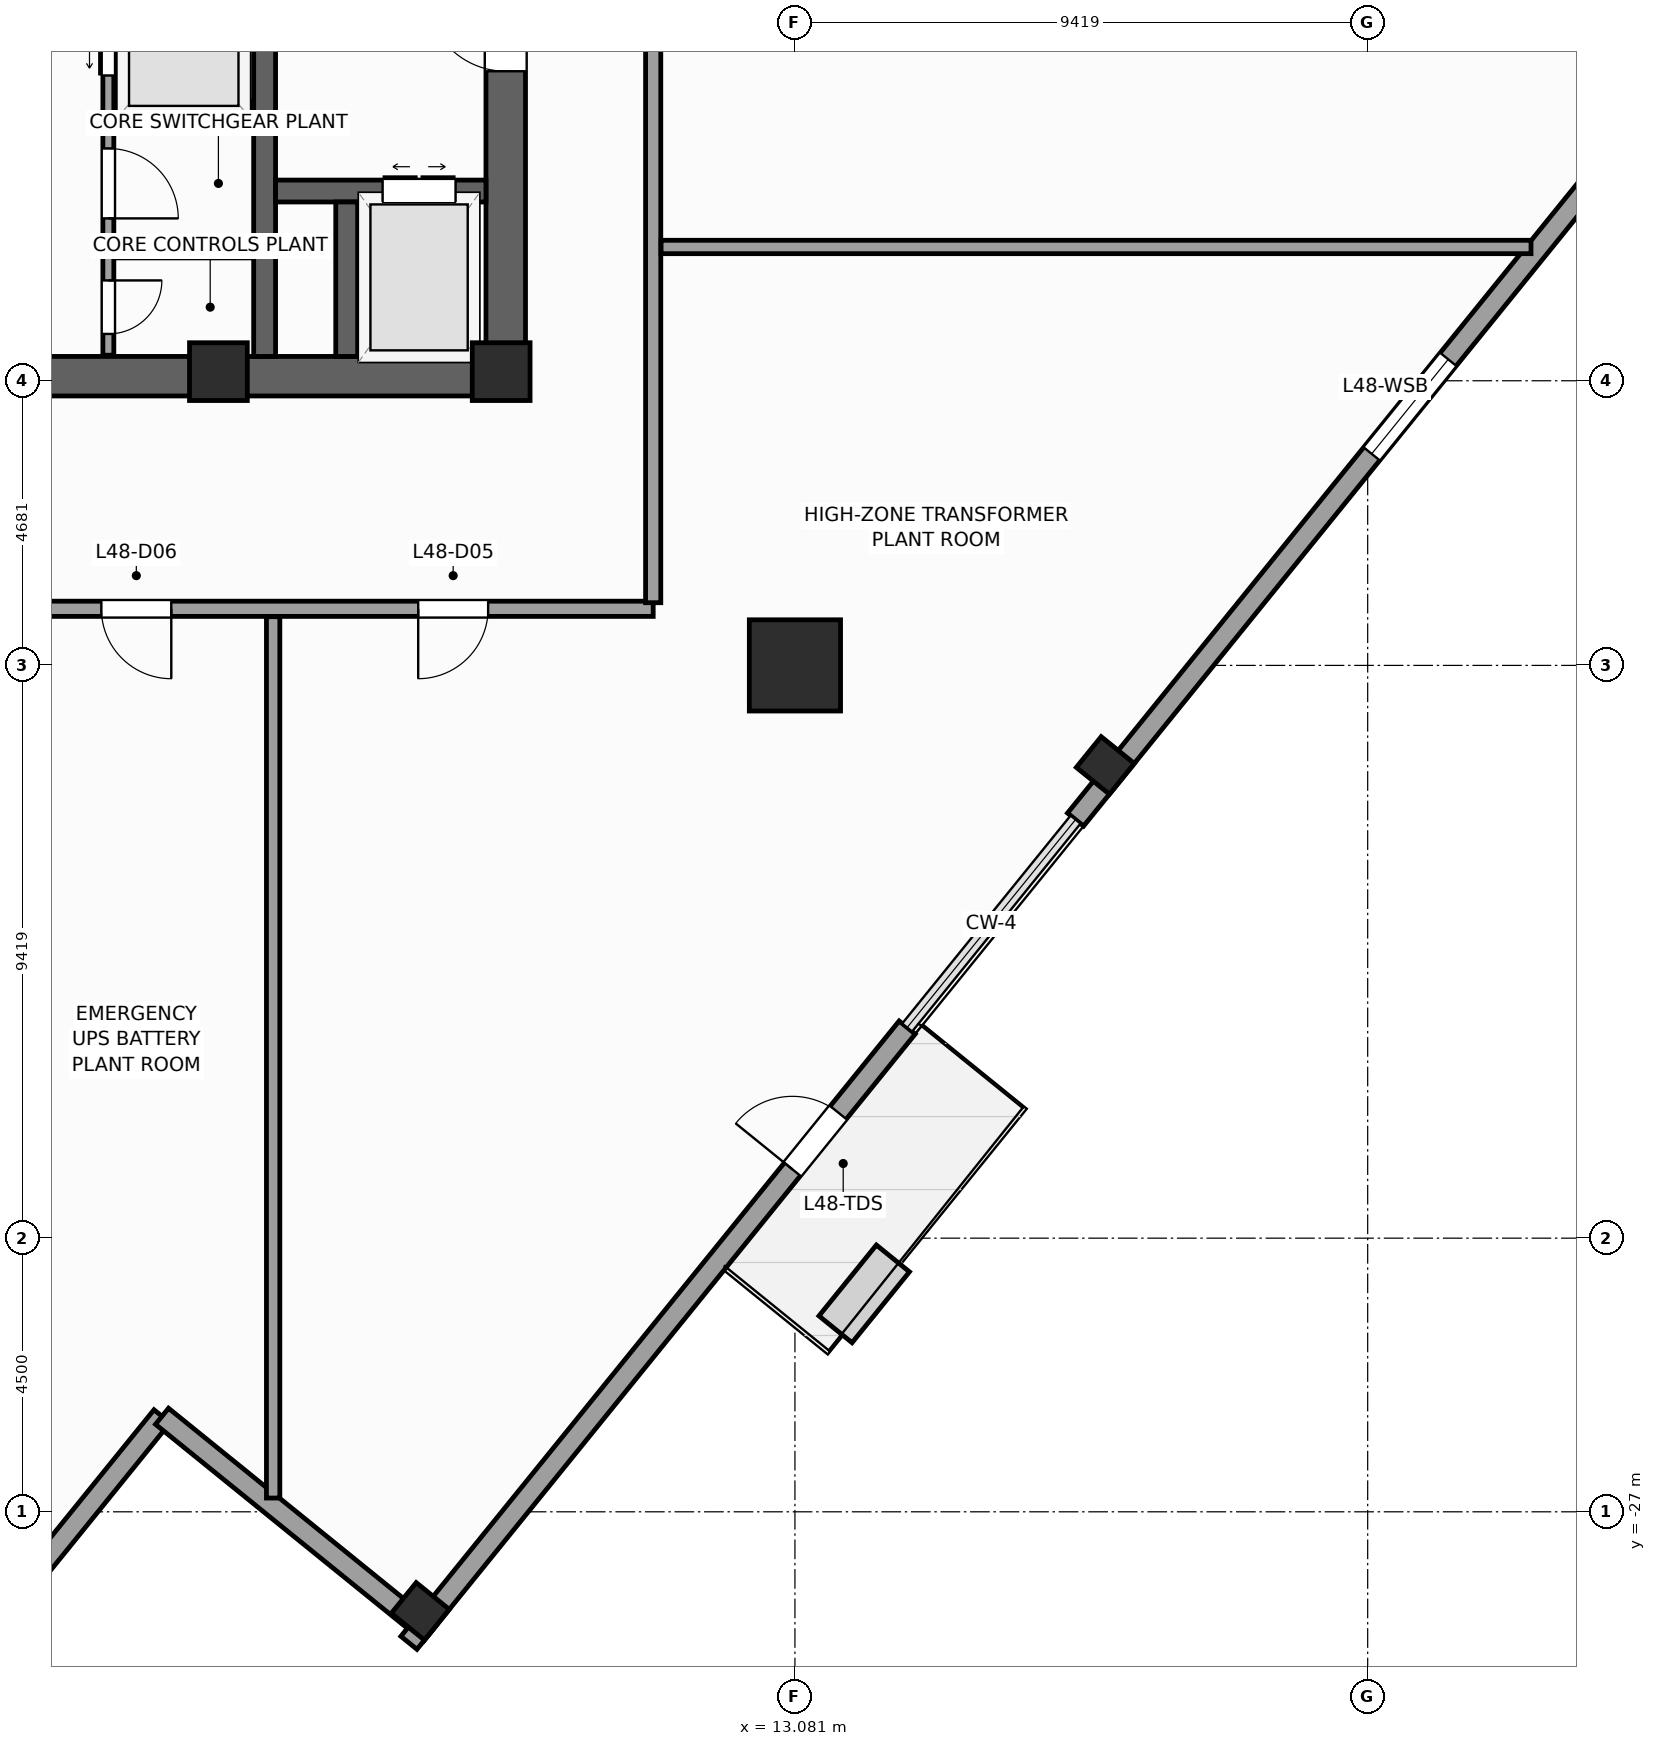
"""IFC4 building model, lengths in metres.
Left out: names, types, materials, properties, quantities, classifications, styles, units other than length and angle.
Written with IfcOpenShell. Run it as: python <this file> out.ifc"""

import sys

from ifc_helpers import new_model, si_unit, direction, frame, frame_2d, origin, origin_2d, place, context, subcontext, project, spatial, rectangle, extrude, source, transform, mapped, element, fill, save


model = new_model("IFC4")
c1 = context("Model", 3, precision=1e-05, world=origin(), true_north=direction((0.0, 1.0)))
c2 = subcontext(c1, "Body", "Model", "MODEL_VIEW")
j1 = project(units=[si_unit("LENGTHUNIT", "METRE"), si_unit("PLANEANGLEUNIT", "RADIAN")], contexts=[c1])
p1 = place(None, origin())
s1 = spatial("IfcSite", under=j1, at=p1, CompositionType="ELEMENT")
p2 = place(p1, origin())
s2 = spatial("IfcBuilding", under=s1, at=p2, CompositionType="ELEMENT")
p3 = place(p2, frame((0.0, 0.0, 200.4)))
s3 = spatial("IfcBuildingStorey", under=s2, at=p3, CompositionType="ELEMENT", Elevation=200.4)
p4 = place(p3, frame((-8.65, -8.325, 0.0), z_axis=(0.0, 0.0, 1.0), x_axis=(1.0, 0.0, 0.0)))
e1 = element("IfcWall", 1, at=p4, inside=s3, PredefinedType="SHEAR", context=c2, shape_type="SweptSolid", body=[
    extrude(rectangle(XDim=17.3, YDim=0.65, at=frame_2d((8.65, 0.0))), origin(), (0.0, 0.0, 1.0), 5.2),
])
p5 = place(p4, frame((8.0, 0.0, 0.0)))
e2 = element("IfcOpeningElement", 2, at=p5, cuts=e1, PredefinedType="OPENING", context=c2, shape_type="SweptSolid", body=[
    extrude(rectangle(XDim=1.3, YDim=2.2, at=frame_2d((0.65, 1.1))), frame((0.0, 0.335, 0.0), z_axis=(0.0, -1.0, 0.0), x_axis=(1.0, 0.0, 0.0)), (0.0, 0.0, 1.0), 0.67),
])
p6 = place(p3, frame((8.325, -8.0, 0.0), z_axis=(0.0, 0.0, 1.0), x_axis=(0.0, 1.0, 0.0)))
e3 = element("IfcWall", 3, at=p6, inside=s3, PredefinedType="SHEAR", context=c2, shape_type="SweptSolid", body=[
    extrude(rectangle(XDim=16.0, YDim=0.65, at=frame_2d((8.0, 0.0))), origin(), (0.0, 0.0, 1.0), 5.2),
])
p7 = place(p6, frame((4.69, 0.0, 0.0)))
e4 = element("IfcOpeningElement", 4, at=p7, cuts=e3, PredefinedType="OPENING", context=c2, shape_type="SweptSolid", body=[
    extrude(rectangle(XDim=1.3, YDim=2.2, at=frame_2d((0.65, 1.1))), frame((0.0, 0.335, 0.0), z_axis=(0.0, -1.0, 0.0), x_axis=(1.0, 0.0, 0.0)), (0.0, 0.0, 1.0), 0.67),
])
p8 = place(p3, frame((4.36, -8.0, 0.0), z_axis=(0.0, 0.0, 1.0), x_axis=(0.0, 1.0, 0.0)))
e5 = element("IfcWall", 5, at=p8, inside=s3, PredefinedType="SHEAR", context=c2, shape_type="SweptSolid", body=[
    extrude(rectangle(XDim=16.0, YDim=0.36, at=frame_2d((8.0, 0.0))), origin(), (0.0, 0.0, 1.0), 5.2),
])
p9 = place(p3, frame((4.54, -5.28, 0.0), z_axis=(0.0, 0.0, 1.0), x_axis=(1.0, 0.0, 0.0)))
e6 = element("IfcWall", 6, at=p9, inside=s3, PredefinedType="SHEAR", context=c2, shape_type="SweptSolid", body=[
    extrude(rectangle(XDim=3.46, YDim=0.36, at=frame_2d((1.73, 0.0))), origin(), (0.0, 0.0, 1.0), 5.2),
])
p10 = place(p9, frame((1.76, 0.0, 0.0)))
e7 = element("IfcOpeningElement", 7, at=p10, cuts=e6, PredefinedType="OPENING", context=c2, shape_type="SweptSolid", body=[
    extrude(rectangle(XDim=1.2, YDim=2.25, at=frame_2d((0.6, 1.125))), frame((0.0, 0.19, 0.0), z_axis=(0.0, -1.0, 0.0), x_axis=(1.0, 0.0, 0.0)), (0.0, 0.0, 1.0), 0.38),
])
p11 = place(p3, frame((5.71, -8.0, 0.0), z_axis=(0.0, 0.0, 1.0), x_axis=(0.0, 1.0, 0.0)))
e8 = element("IfcWall", 8, at=p11, inside=s3, PredefinedType="SHEAR", context=c2, shape_type="SweptSolid", body=[
    extrude(rectangle(XDim=2.54, YDim=0.36, at=frame_2d((1.27, 0.0))), origin(), (0.0, 0.0, 1.0), 5.2),
])
m1 = source(origin(), c2, "Body", "SweptSolid", [
    extrude(rectangle(XDim=0.95, YDim=0.95, at=origin_2d()), origin(), (0.0, 0.0, 1.0), 5.2),
])
for number, where, z_axis, x_axis in (
    (9, (8.25, -8.25, 0.0), (0.0, 0.0, 1.0), (1.0, 0.0, 0.0)),
    (10, (3.6, -8.25, 0.0), (0.0, 0.0, 1.0), (1.0, 0.0, 0.0)),
):
    element("IfcColumn", number, at=place(p3, frame(where, z_axis=z_axis, x_axis=x_axis)), inside=s3, PredefinedType="PILASTER", context=c2, shape_type="MappedRepresentation", body=[
        mapped(m1, transform((0.0, 0.0, 0.0), scale=1.0)),
    ])
m2 = source(origin(), c2, "Body", "SweptSolid", [
    extrude(rectangle(XDim=1.5, YDim=1.5, at=origin_2d()), origin(), (0.0, 0.0, 1.0), 5.2),
])
p12 = place(p3, frame((13.081, -13.081, 0.0), z_axis=(0.0, 0.0, 1.0), x_axis=(1.0, 0.0, 0.0)))
e11 = element("IfcColumn", 11, at=p12, inside=s3, PredefinedType="COLUMN", context=c2, shape_type="MappedRepresentation", body=[
    mapped(m2, transform((0.0, 0.0, 0.0), scale=1.0)),
])
m3 = source(origin(), c2, "Body", "SweptSolid", [
    extrude(rectangle(XDim=0.65, YDim=0.7, at=origin_2d()), origin(), (0.0, 0.0, 1.0), 5.2),
])
for number, where, z_axis, x_axis in (
    (12, (6.92, -28.637, 0.0), (0.0, 0.0, 1.0), (0.629, 0.777, 0.0)),
    (13, (18.185, -14.726, 0.0), (0.0, 0.0, 1.0), (0.629, 0.777, 0.0)),
):
    element("IfcColumn", number, at=place(p3, frame(where, z_axis=z_axis, x_axis=x_axis)), inside=s3, PredefinedType="COLUMN", context=c2, shape_type="MappedRepresentation", body=[
        mapped(m3, transform((0.0, 0.0, 0.0), scale=1.0)),
    ])
p13 = place(p3, frame((-0.789, -29.703, 0.0), z_axis=(0.0, 0.0, 1.0), x_axis=(0.629323365087, 0.77714355312, 0.0)))
e14 = element("IfcWall", 14, at=p13, inside=s3, PredefinedType="STANDARD", context=c2, shape_type="SweptSolid", body=[
    extrude(rectangle(XDim=5.5, YDim=0.34, at=frame_2d((2.75, 0.0))), origin(), (0.0, 0.0, 1.0), 4.96),
])
p14 = place(p3, frame((2.673, -25.429, 0.0), z_axis=(0.0, 0.0, 1.0), x_axis=(0.777162640055, -0.629299794138, 0.0)))
e15 = element("IfcWall", 15, at=p14, inside=s3, PredefinedType="STANDARD", context=c2, shape_type="SweptSolid", body=[
    extrude(rectangle(XDim=5.67, YDim=0.34, at=frame_2d((2.835, 0.0))), origin(), (0.0, 0.0, 1.0), 4.96),
])
p15 = place(p3, frame((6.733, -29.154, 0.0), z_axis=(0.0, 0.0, 1.0), x_axis=(0.629326061894, 0.777141369263, 0.0)))
e16 = element("IfcWall", 16, at=p15, inside=s3, PredefinedType="STANDARD", context=c2, shape_type="SweptSolid", body=[
    extrude(rectangle(XDim=13.02, YDim=0.34, at=frame_2d((6.51, 0.0))), origin(), (0.0, 0.0, 1.0), 4.26),
])
p16 = place(p15, frame((10.02, 0.0, 0.0)))
e17 = element("IfcOpeningElement", 17, at=p16, cuts=e16, PredefinedType="OPENING", context=c2, shape_type="SweptSolid", body=[
    extrude(rectangle(XDim=1.2, YDim=2.3, at=frame_2d((0.6, 1.15))), frame((0.0, 0.18, 0.0), z_axis=(0.0, -1.0, 0.0), x_axis=(1.0, 0.0, 0.0)), (0.0, 0.0, 1.0), 0.36),
])
p17 = place(p3, frame((17.696, -15.616, 0.0), z_axis=(0.0, 0.0, 1.0), x_axis=(0.629324798011, 0.777142392749, 0.0)))
e18 = element("IfcWall", 18, at=p17, inside=s3, PredefinedType="STANDARD", context=c2, shape_type="SweptSolid", body=[
    extrude(rectangle(XDim=19.42, YDim=0.34, at=frame_2d((9.71, 0.0))), origin(), (0.0, 0.0, 1.0), 4.26),
])
p18 = place(p17, frame((7.739, 0.0, 0.65)))
e19 = element("IfcOpeningElement", 19, at=p18, cuts=e18, PredefinedType="OPENING", context=c2, shape_type="SweptSolid", body=[
    extrude(rectangle(XDim=2.0, YDim=1.45, at=frame_2d((1.0, 0.725))), frame((0.0, 0.18, 0.0), z_axis=(0.0, -1.0, 0.0), x_axis=(1.0, 0.0, 0.0)), (0.0, 0.0, 1.0), 0.36),
])
p19 = place(p3, frame((1.79, -7.98, 0.0), z_axis=(0.0, 0.0, 1.0), x_axis=(0.0, 1.0, 0.0)))
e20 = element("IfcWall", 20, at=p19, inside=s3, PredefinedType="PARTITIONING", context=c2, shape_type="SweptSolid", body=[
    extrude(rectangle(XDim=12.38, YDim=0.18, at=frame_2d((6.19, 0.0))), origin(), (0.0, 0.0, 1.0), 4.96),
])
p20 = place(p19, frame((4.6, 0.0, 0.0)))
e21 = element("IfcOpeningElement", 21, at=p20, cuts=e20, PredefinedType="OPENING", context=c2, shape_type="SweptSolid", body=[
    extrude(rectangle(XDim=1.1, YDim=2.2, at=frame_2d((0.55, 1.1))), frame((0.0, 0.1, 0.0), z_axis=(0.0, -1.0, 0.0), x_axis=(1.0, 0.0, 0.0)), (0.0, 0.0, 1.0), 0.2),
])
p21 = place(p19, frame((6.66, 0.0, 0.0)))
e22 = element("IfcOpeningElement", 22, at=p21, cuts=e20, PredefinedType="OPENING", context=c2, shape_type="SweptSolid", body=[
    extrude(rectangle(XDim=1.1, YDim=2.2, at=frame_2d((0.55, 1.1))), frame((0.0, 0.1, 0.0), z_axis=(0.0, -1.0, 0.0), x_axis=(1.0, 0.0, 0.0)), (0.0, 0.0, 1.0), 0.2),
])
p22 = place(p19, frame((0.35, 0.0, 0.0)))
e23 = element("IfcOpeningElement", 23, at=p22, cuts=e20, PredefinedType="OPENING", context=c2, shape_type="SweptSolid", body=[
    extrude(rectangle(XDim=0.88, YDim=2.1, at=frame_2d((0.44, 1.05))), frame((0.0, 0.1, 0.0), z_axis=(0.0, -1.0, 0.0), x_axis=(1.0, 0.0, 0.0)), (0.0, 0.0, 1.0), 0.2),
])
p23 = place(p19, frame((2.25, 0.0, 0.0)))
e24 = element("IfcOpeningElement", 24, at=p23, cuts=e20, PredefinedType="OPENING", context=c2, shape_type="SweptSolid", body=[
    extrude(rectangle(XDim=1.15, YDim=2.25, at=frame_2d((0.575, 1.125))), frame((0.0, 0.1, 0.0), z_axis=(0.0, -1.0, 0.0), x_axis=(1.0, 0.0, 0.0)), (0.0, 0.0, 1.0), 0.2),
])
p24 = place(p3, frame((1.89, -3.9, 0.0), z_axis=(0.0, 0.0, 1.0), x_axis=(1.0, 0.0, 0.0)))
e25 = element("IfcWall", 25, at=p24, inside=s3, PredefinedType="PARTITIONING", context=c2, shape_type="SweptSolid", body=[
    extrude(rectangle(XDim=2.28, YDim=0.18, at=frame_2d((1.14, 0.0))), origin(), (0.0, 0.0, 1.0), 4.96),
])
p25 = place(p3, frame((1.89, -6.3, 0.0), z_axis=(0.0, 0.0, 1.0), x_axis=(1.0, 0.0, 0.0)))
e26 = element("IfcWall", 26, at=p25, inside=s3, PredefinedType="PARTITIONING", context=c2, shape_type="SweptSolid", body=[
    extrude(rectangle(XDim=2.28, YDim=0.16, at=frame_2d((1.14, 0.0))), origin(), (0.0, 0.0, 1.0), 4.96),
])
p26 = place(p3, frame((-12.15, -12.15, 0.0), z_axis=(0.0, 0.0, 1.0), x_axis=(1.0, 0.0, 0.0)))
e27 = element("IfcWall", 27, at=p26, inside=s3, PredefinedType="PARTITIONING", context=c2, shape_type="SweptSolid", body=[
    extrude(rectangle(XDim=22.9, YDim=0.25, at=frame_2d((11.45, 0.0))), origin(), (0.0, 0.0, 1.0), 4.96),
])
p27 = place(p26, frame((19.036, 0.0, 0.0)))
e28 = element("IfcOpeningElement", 28, at=p27, cuts=e27, PredefinedType="OPENING", context=c2, shape_type="SweptSolid", body=[
    extrude(rectangle(XDim=1.15, YDim=2.25, at=frame_2d((0.575, 1.125))), frame((0.0, 0.135, 0.0), z_axis=(0.0, -1.0, 0.0), x_axis=(1.0, 0.0, 0.0)), (0.0, 0.0, 1.0), 0.27),
])
p28 = place(p26, frame((13.825, 0.0, 0.0)))
e29 = element("IfcOpeningElement", 29, at=p28, cuts=e27, PredefinedType="OPENING", context=c2, shape_type="SweptSolid", body=[
    extrude(rectangle(XDim=1.15, YDim=2.25, at=frame_2d((0.575, 1.125))), frame((0.0, 0.135, 0.0), z_axis=(0.0, -1.0, 0.0), x_axis=(1.0, 0.0, 0.0)), (0.0, 0.0, 1.0), 0.27),
])
p29 = place(p26, frame((9.075, 0.0, 0.0)))
e30 = element("IfcOpeningElement", 30, at=p29, cuts=e27, PredefinedType="OPENING", context=c2, shape_type="SweptSolid", body=[
    extrude(rectangle(XDim=1.15, YDim=2.25, at=frame_2d((0.575, 1.125))), frame((0.0, 0.135, 0.0), z_axis=(0.0, -1.0, 0.0), x_axis=(1.0, 0.0, 0.0)), (0.0, 0.0, 1.0), 0.27),
])
p30 = place(p26, frame((3.165, 0.0, 0.0)))
e31 = element("IfcOpeningElement", 31, at=p30, cuts=e27, PredefinedType="OPENING", context=c2, shape_type="SweptSolid", body=[
    extrude(rectangle(XDim=1.15, YDim=2.25, at=frame_2d((0.575, 1.125))), frame((0.0, 0.135, 0.0), z_axis=(0.0, -1.0, 0.0), x_axis=(1.0, 0.0, 0.0)), (0.0, 0.0, 1.0), 0.27),
])
p31 = place(p3, frame((10.75, -12.05, 0.0), z_axis=(0.0, 0.0, 1.0), x_axis=(0.0, 1.0, 0.0)))
e32 = element("IfcWall", 32, at=p31, inside=s3, PredefinedType="PARTITIONING", context=c2, shape_type="SweptSolid", body=[
    extrude(rectangle(XDim=24.1, YDim=0.25, at=frame_2d((12.05, 0.0))), origin(), (0.0, 0.0, 1.0), 4.96),
])
p32 = place(p31, frame((20.436, 0.0, 0.0)))
e33 = element("IfcOpeningElement", 33, at=p32, cuts=e32, PredefinedType="OPENING", context=c2, shape_type="SweptSolid", body=[
    extrude(rectangle(XDim=1.15, YDim=2.25, at=frame_2d((0.575, 1.125))), frame((0.0, 0.135, 0.0), z_axis=(0.0, -1.0, 0.0), x_axis=(1.0, 0.0, 0.0)), (0.0, 0.0, 1.0), 0.27),
])
p33 = place(p31, frame((11.475, 0.0, 0.0)))
e34 = element("IfcOpeningElement", 34, at=p33, cuts=e32, PredefinedType="OPENING", context=c2, shape_type="SweptSolid", body=[
    extrude(rectangle(XDim=1.15, YDim=2.25, at=frame_2d((0.575, 1.125))), frame((0.0, 0.135, 0.0), z_axis=(0.0, -1.0, 0.0), x_axis=(1.0, 0.0, 0.0)), (0.0, 0.0, 1.0), 0.27),
])
p34 = place(p3, frame((10.88, -6.2, 0.0), z_axis=(0.0, 0.0, 1.0), x_axis=(1.0, 0.0, 0.0)))
e35 = element("IfcWall", 35, at=p34, inside=s3, PredefinedType="PARTITIONING", context=c2, shape_type="SweptSolid", body=[
    extrude(rectangle(XDim=14.306, YDim=0.22, at=frame_2d((7.153, 0.0))), origin(), (0.0, 0.0, 1.0), 4.96),
])
p35 = place(p3, frame((4.5, -12.28, 0.0), z_axis=(0.0, 0.0, 1.0), x_axis=(0.0, -1.0, 0.0)))
e36 = element("IfcWall", 36, at=p35, inside=s3, PredefinedType="PARTITIONING", context=c2, shape_type="SweptSolid", body=[
    extrude(rectangle(XDim=14.493, YDim=0.22, at=frame_2d((7.247, 0.0))), origin(), (0.0, 0.0, 1.0), 4.96),
])
m4 = source(origin(), c2, "Body", "SweptSolid", [
    extrude(rectangle(XDim=2.0, YDim=1.45, at=frame_2d((1.0, 0.725))), frame((0.0, 0.03, 0.0), z_axis=(0.0, -1.0, 0.0), x_axis=(1.0, 0.0, 0.0)), (0.0, 0.0, 1.0), 0.06),
])
p36 = place(p18, origin())
e37 = element("IfcWindow", 37, at=p36, inside=s3, PartitioningType="SINGLE_PANEL", PredefinedType="WINDOW", context=c2, shape_type="MappedRepresentation", body=[
    mapped(m4, transform((0.0, 0.0, 0.0), scale=1.0)),
])
fill(e19, e37)
m5 = source(origin(), c2, "Body", "SweptSolid", [
    extrude(rectangle(XDim=1.2, YDim=2.3, at=frame_2d((0.6, 1.15))), frame((0.0, 0.025, 0.0), z_axis=(0.0, -1.0, 0.0), x_axis=(1.0, 0.0, 0.0)), (0.0, 0.0, 1.0), 0.05),
])
p37 = place(p16, origin())
e38 = element("IfcDoor", 38, at=p37, inside=s3, OperationType="SINGLE_SWING_LEFT", PredefinedType="DOOR", context=c2, shape_type="MappedRepresentation", body=[
    mapped(m5, transform((0.0, 0.0, 0.0), scale=1.0)),
])
fill(e17, e38)
m6 = source(origin(), c2, "Body", "SweptSolid", [
    extrude(rectangle(XDim=1.3, YDim=2.2, at=frame_2d((0.65, 1.1))), frame((0.0, 0.025, 0.0), z_axis=(0.0, -1.0, 0.0), x_axis=(1.0, 0.0, 0.0)), (0.0, 0.0, 1.0), 0.05),
])
p38 = place(p7, origin())
e39 = element("IfcDoor", 39, at=p38, inside=s3, OperationType="SINGLE_SWING_RIGHT", PredefinedType="DOOR", context=c2, shape_type="MappedRepresentation", body=[
    mapped(m6, transform((0.0, 0.0, 0.0), scale=1.0)),
])
fill(e4, e39)
m7 = source(origin(), c2, "Body", "SweptSolid", [
    extrude(rectangle(XDim=1.2, YDim=2.25, at=frame_2d((0.6, 1.125))), frame((0.0, 0.025, 0.0), z_axis=(0.0, -1.0, 0.0), x_axis=(1.0, 0.0, 0.0)), (0.0, 0.0, 1.0), 0.05),
])
p39 = place(p10, origin())
e40 = element("IfcDoor", 40, at=p39, inside=s3, OperationType="DOUBLE_DOOR_SLIDING", PredefinedType="DOOR", context=c2, shape_type="MappedRepresentation", body=[
    mapped(m7, transform((0.0, 0.0, 0.0), scale=1.0)),
])
fill(e7, e40)
m8 = source(origin(), c2, "Body", "SweptSolid", [
    extrude(rectangle(XDim=1.1, YDim=2.2, at=frame_2d((0.55, 1.1))), frame((0.0, 0.025, 0.0), z_axis=(0.0, -1.0, 0.0), x_axis=(1.0, 0.0, 0.0)), (0.0, 0.0, 1.0), 0.05),
])
p40 = place(p20, origin())
e41 = element("IfcDoor", 41, at=p40, inside=s3, OperationType="DOUBLE_DOOR_SLIDING", PredefinedType="DOOR", context=c2, shape_type="MappedRepresentation", body=[
    mapped(m8, transform((0.0, 0.0, 0.0), scale=1.0)),
])
fill(e21, e41)
m9 = source(origin(), c2, "Body", "SweptSolid", [
    extrude(rectangle(XDim=0.88, YDim=2.1, at=frame_2d((0.44, 1.05))), frame((0.0, 0.025, 0.0), z_axis=(0.0, -1.0, 0.0), x_axis=(1.0, 0.0, 0.0)), (0.0, 0.0, 1.0), 0.05),
])
p41 = place(p22, frame((0.88, 0.0, 0.0), z_axis=(0.0, 0.0, 1.0), x_axis=(-1.0, 0.0, 0.0)))
e42 = element("IfcDoor", 42, at=p41, inside=s3, OperationType="SINGLE_SWING_RIGHT", PredefinedType="DOOR", context=c2, shape_type="MappedRepresentation", body=[
    mapped(m9, transform((0.0, 0.0, 0.0), scale=1.0)),
])
fill(e23, e42)
m10 = source(origin(), c2, "Body", "SweptSolid", [
    extrude(rectangle(XDim=1.15, YDim=2.25, at=frame_2d((0.575, 1.125))), frame((0.0, 0.025, 0.0), z_axis=(0.0, -1.0, 0.0), x_axis=(1.0, 0.0, 0.0)), (0.0, 0.0, 1.0), 0.05),
])
p42 = place(p23, frame((1.15, 0.0, 0.0), z_axis=(0.0, 0.0, 1.0), x_axis=(-1.0, 0.0, 0.0)))
e43 = element("IfcDoor", 43, at=p42, inside=s3, OperationType="SINGLE_SWING_LEFT", PredefinedType="DOOR", context=c2, shape_type="MappedRepresentation", body=[
    mapped(m10, transform((0.0, 0.0, 0.0), scale=1.0)),
])
fill(e24, e43)
p43 = place(p27, frame((1.15, 0.0, 0.0), z_axis=(0.0, 0.0, 1.0), x_axis=(-1.0, 0.0, 0.0)))
e44 = element("IfcDoor", 44, at=p43, inside=s3, OperationType="SINGLE_SWING_LEFT", PredefinedType="DOOR", context=c2, shape_type="MappedRepresentation", body=[
    mapped(m10, transform((0.0, 0.0, 0.0), scale=1.0)),
])
fill(e28, e44)
p44 = place(p28, frame((1.15, 0.0, 0.0), z_axis=(0.0, 0.0, 1.0), x_axis=(-1.0, 0.0, 0.0)))
e45 = element("IfcDoor", 45, at=p44, inside=s3, OperationType="SINGLE_SWING_RIGHT", PredefinedType="DOOR", context=c2, shape_type="MappedRepresentation", body=[
    mapped(m10, transform((0.0, 0.0, 0.0), scale=1.0)),
])
fill(e29, e45)
save(model, sys.argv[1])
